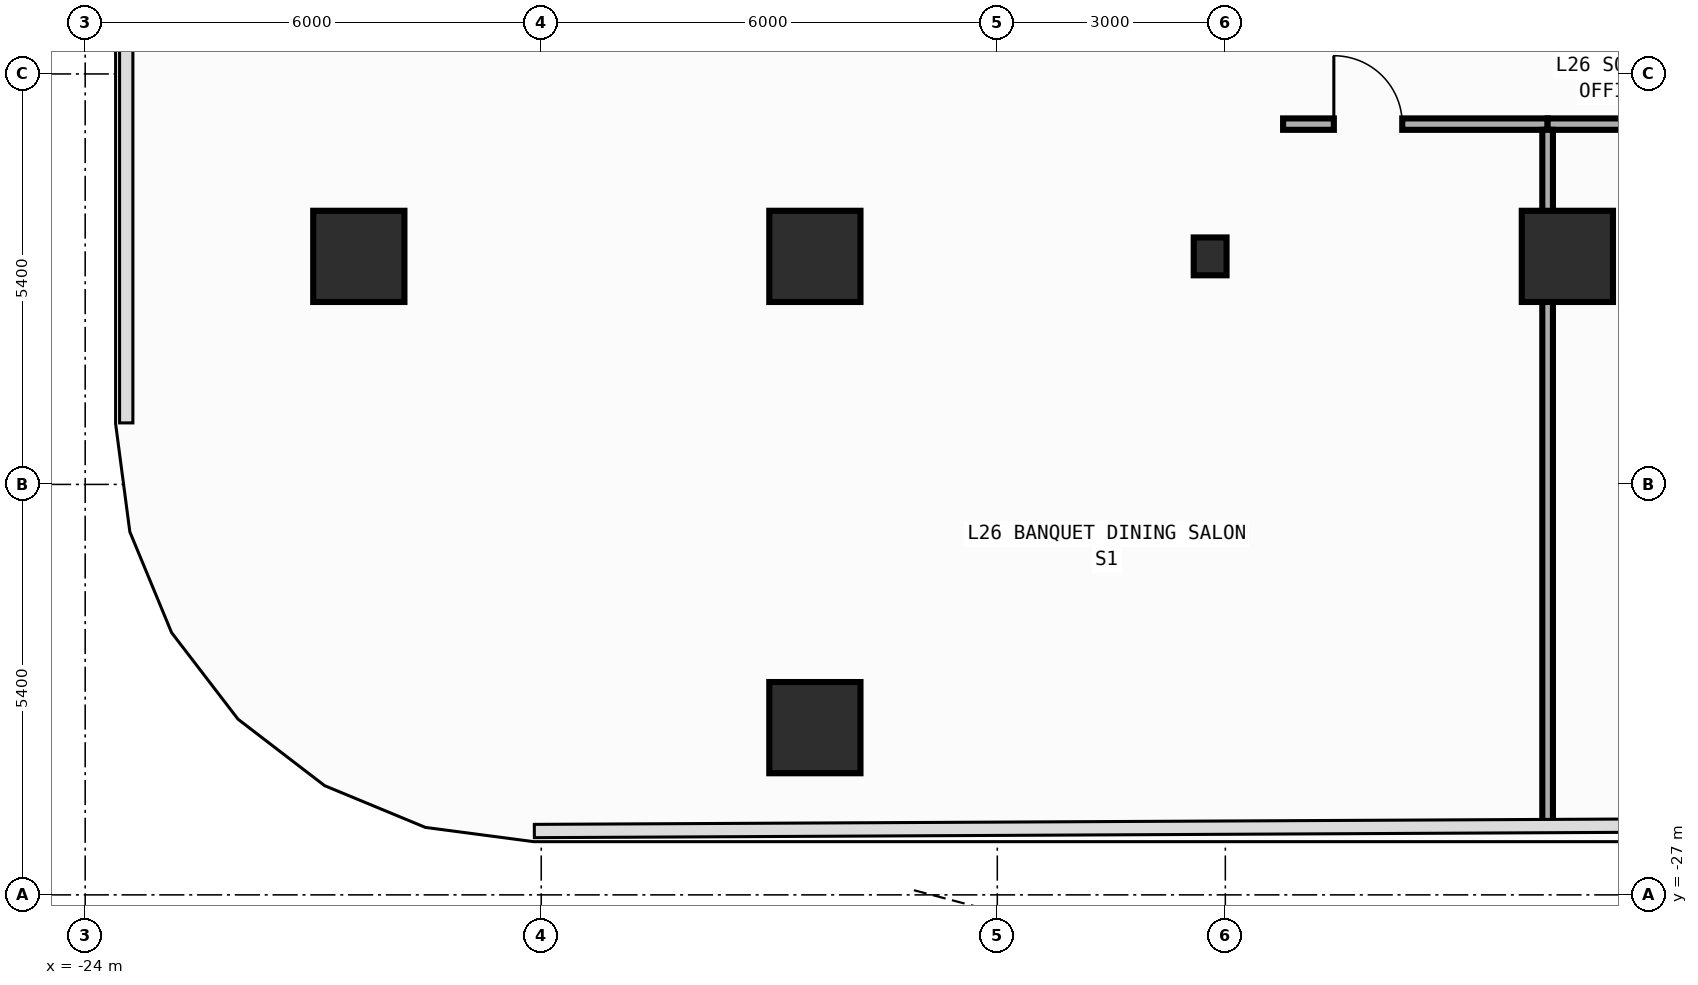
"""IFC4 building model, lengths in metres.
Left out: names, types, materials, properties, quantities, classifications, styles, units other than length and angle.
Written with IfcOpenShell. Run it as: python <this file> out.ifc"""

import sys

from ifc_helpers import new_model, si_unit, direction, frame, frame_2d, origin, origin_2d, place, context, subcontext, project, spatial, rectangle, i_section, extrude, element, fill, save


model = new_model("IFC4")
c1 = context("Model", 3, precision=1e-05, world=origin(), true_north=direction((0.0, 1.0)))
c2 = subcontext(c1, "Body", "Model", "MODEL_VIEW")
j1 = project(units=[si_unit("LENGTHUNIT", "METRE"), si_unit("PLANEANGLEUNIT", "RADIAN")], contexts=[c1])
p1 = place(None, origin())
s1 = spatial("IfcSite", under=j1, at=p1, CompositionType="ELEMENT")
p2 = place(p1, origin())
s2 = spatial("IfcBuilding", under=s1, at=p2, CompositionType="ELEMENT")
p3 = place(p2, frame((0.0, 0.0, 114.2)))
s3 = spatial("IfcBuildingStorey", under=s2, at=p3, CompositionType="ELEMENT", Elevation=114.2)
p4 = place(p3, frame((-9.2, -18.6, 0.0), z_axis=(0.0, 0.0, 1.0), x_axis=(1.0, 0.0, 0.0)))
e1 = element("IfcColumn", 1, at=p4, inside=s3, PredefinedType="COLUMN", context=c2, shape_type="SweptSolid", body=[
    extrude(i_section(OverallWidth=0.432, OverallDepth=0.498, WebThickness=0.045, FlangeThickness=0.07, FilletRadius=0.022, at=origin_2d()), origin(), (0.0, 0.0, 1.0), 4.2),
])
for number, where, z_axis, x_axis in (
    (2, (-20.4, -18.6, 0.0), (0.0, 0.0, 1.0), (1.0, 0.0, 0.0)),
    (3, (-14.4, -18.6, 0.0), (0.0, 0.0, 1.0), (1.0, 0.0, 0.0)),
    (4, (-4.5, -18.6, 0.0), (0.0, 0.0, 1.0), (1.0, 0.0, 0.0)),
    (5, (-14.4, -24.8, 0.0), (0.0, 0.0, 1.0), (1.0, 0.0, 0.0)),
):
    element("IfcColumn", number, at=place(p3, frame(where, z_axis=z_axis, x_axis=x_axis)), inside=s3, PredefinedType="COLUMN", context=c2, shape_type="SweptSolid", body=[
        extrude(rectangle(XDim=1.2, YDim=1.2, at=origin_2d()), origin(), (0.0, 0.0, 1.0), 4.2),
    ])
p5 = place(p3, frame((-8.24, -16.86, 0.0), z_axis=(0.0, 0.0, 1.0), x_axis=(1.0, 0.0, 0.0)))
e6 = element("IfcWall", 6, at=p5, inside=s3, PredefinedType="PARTITIONING", context=c2, shape_type="SweptSolid", body=[
    extrude(rectangle(XDim=3.48, YDim=0.15, at=frame_2d((1.74, 0.0))), origin(), (0.0, 0.0, 1.0), 3.94),
])
p6 = place(p5, frame((0.667, 0.0, 0.0)))
e7 = element("IfcOpeningElement", 7, at=p6, cuts=e6, PredefinedType="OPENING", context=c2, shape_type="SweptSolid", body=[
    extrude(rectangle(XDim=0.9, YDim=2.15, at=frame_2d((0.45, 1.075))), frame((0.0, 0.085, 0.0), z_axis=(0.0, -1.0, 0.0), x_axis=(1.0, 0.0, 0.0)), (0.0, 0.0, 1.0), 0.17),
])
p7 = place(p3, frame((-4.76, -16.86, 0.0), z_axis=(0.0, 0.0, 1.0), x_axis=(1.0, 0.0, 0.0)))
e8 = element("IfcWall", 8, at=p7, inside=s3, PredefinedType="PARTITIONING", context=c2, shape_type="SweptSolid", body=[
    extrude(rectangle(XDim=13.0, YDim=0.15, at=frame_2d((6.5, 0.0))), origin(), (0.0, 0.0, 1.0), 3.94),
])
p8 = place(p7, frame((11.437, 0.0, 0.0)))
e9 = element("IfcOpeningElement", 9, at=p8, cuts=e8, PredefinedType="OPENING", context=c2, shape_type="SweptSolid", body=[
    extrude(rectangle(XDim=0.9, YDim=2.15, at=frame_2d((0.45, 1.075))), frame((0.0, 0.085, 0.0), z_axis=(0.0, -1.0, 0.0), x_axis=(1.0, 0.0, 0.0)), (0.0, 0.0, 1.0), 0.17),
])
p9 = place(p3, frame((-4.76, -26.09, 0.0), z_axis=(0.0, 0.0, 1.0), x_axis=(0.0, 1.0, 0.0)))
e10 = element("IfcWall", 10, at=p9, inside=s3, PredefinedType="PARTITIONING", context=c2, shape_type="SweptSolid", body=[
    extrude(rectangle(XDim=9.155, YDim=0.14, at=frame_2d((4.577, 0.0))), origin(), (0.0, 0.0, 1.0), 3.49),
])
p10 = place(p6, origin())
e11 = element("IfcDoor", 11, at=p10, inside=s3, OperationType="SINGLE_SWING_LEFT", PredefinedType="DOOR", context=c2, shape_type="SweptSolid", body=[
    extrude(rectangle(XDim=0.9, YDim=2.15, at=frame_2d((0.45, 1.075))), frame((0.0, 0.025, 0.0), z_axis=(0.0, -1.0, 0.0), x_axis=(1.0, 0.0, 0.0)), (0.0, 0.0, 1.0), 0.05),
])
fill(e7, e11)
save(model, sys.argv[1])
